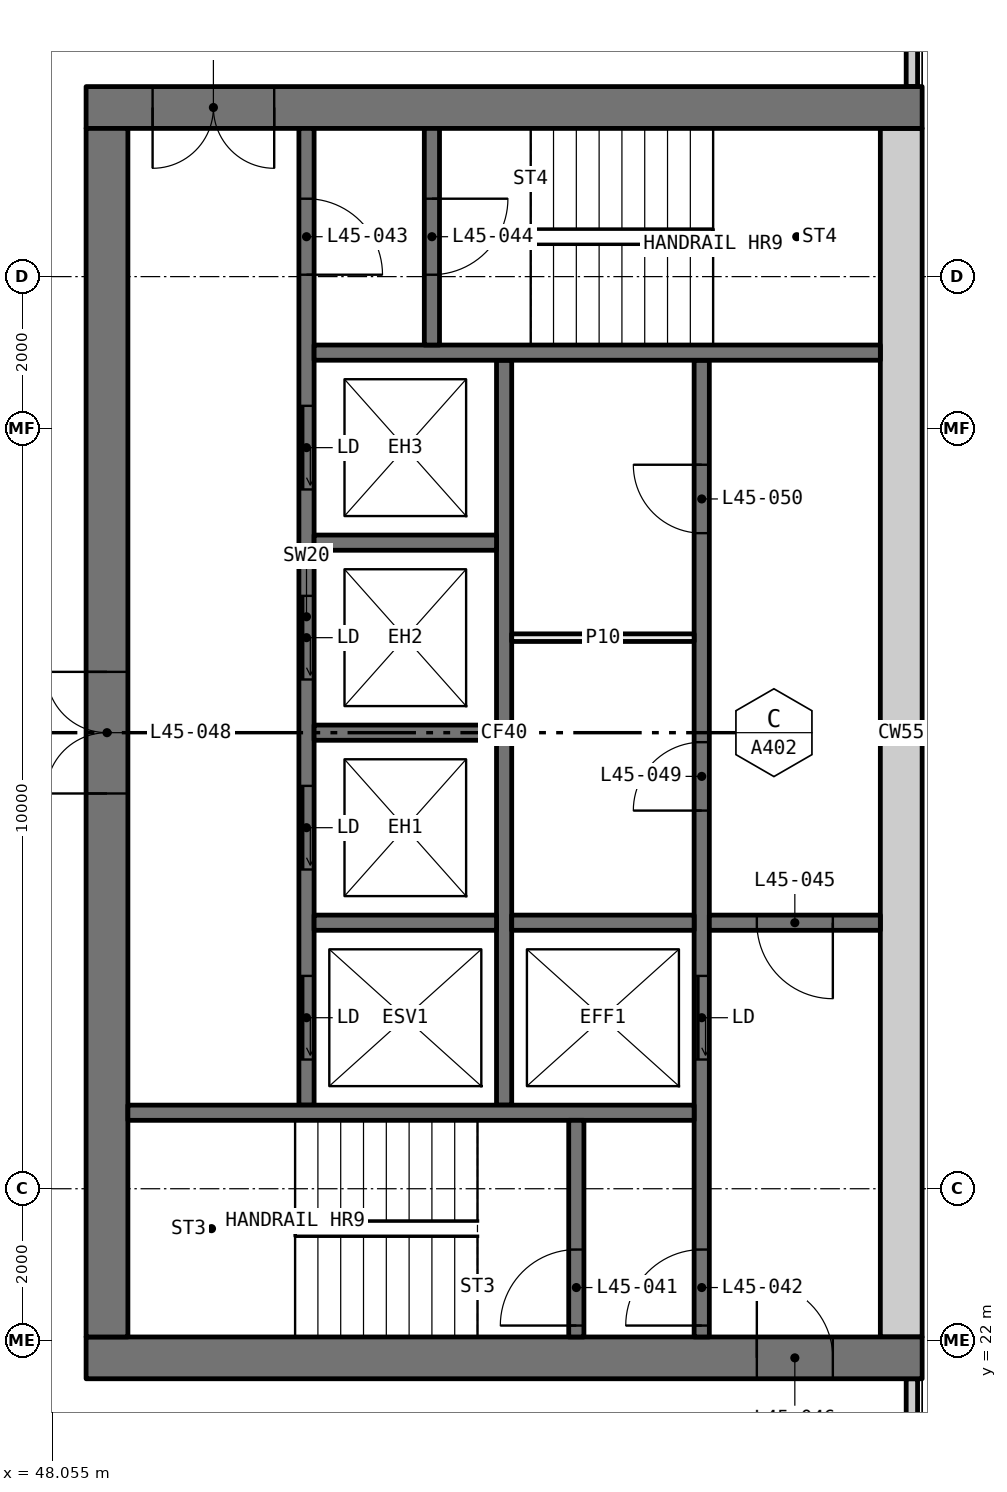
"""IFC4 building model, lengths in metres.
Left out: names, types, materials, properties, quantities, classifications, styles, units other than length and angle.
Written with IfcOpenShell. Run it as: python <this file> out.ifc"""

import sys

from ifc_helpers import new_model, si_unit, direction, frame, frame_2d, origin, place, context, subcontext, project, spatial, rectangle, extrude, element, fill, save


model = new_model("IFC4")
c1 = context("Model", 3, precision=1e-05, world=origin(), true_north=direction((0.0, 1.0)))
c2 = subcontext(c1, "Body", "Model", "MODEL_VIEW")
j1 = project(units=[si_unit("LENGTHUNIT", "METRE"), si_unit("PLANEANGLEUNIT", "RADIAN")], contexts=[c1])
p1 = place(None, origin())
s1 = spatial("IfcSite", under=j1, at=p1, CompositionType="ELEMENT")
p2 = place(p1, origin())
s2 = spatial("IfcBuilding", under=s1, at=p2, CompositionType="ELEMENT")
p3 = place(p2, frame((0.0, 0.0, 172.05)))
s3 = spatial("IfcBuildingStorey", under=s2, at=p3, CompositionType="ELEMENT", Elevation=172.05)
for number, where, z_axis, x_axis in (
    (1, (59.365, 18.71, 0.0), (0.0, 0.0, 1.0), (0.0, 1.0, 0.0)),
    (2, (59.365, 38.5, 0.0), (0.0, 0.0, 1.0), (0.0, 1.0, 0.0)),
):
    element("IfcWall", number, at=place(p3, frame(where, z_axis=z_axis, x_axis=x_axis)), inside=s3, PredefinedType="ELEMENTEDWALL", context=c2, shape_type="SweptSolid", body=[
        extrude(rectangle(XDim=2.79, YDim=0.15, at=frame_2d((1.395, 0.0))), origin(), (0.0, 0.0, 1.0), 3.05),
    ])
p4 = place(p3, frame((59.5, 21.775, 0.0), z_axis=(0.0, 0.0, 1.0), x_axis=(-1.0, 0.0, 0.0)))
e3 = element("IfcWall", 3, at=p4, inside=s3, PredefinedType="SHEAR", context=c2, shape_type="SweptSolid", body=[
    extrude(rectangle(XDim=11.0, YDim=0.55, at=frame_2d((5.5, 0.0))), origin(), (0.0, 0.0, 1.0), 3.05),
])
p5 = place(p4, frame((1.175, 0.0, 0.0)))
e4 = element("IfcOpeningElement", 4, at=p5, cuts=e3, PredefinedType="OPENING", context=c2, shape_type="SweptSolid", body=[
    extrude(rectangle(XDim=1.0, YDim=2.1, at=frame_2d((0.5, 1.05))), frame((0.0, 0.285, 0.0), z_axis=(0.0, -1.0, 0.0), x_axis=(1.0, 0.0, 0.0)), (0.0, 0.0, 1.0), 0.57),
])
p6 = place(p3, frame((59.5, 38.225, 0.0), z_axis=(0.0, 0.0, 1.0), x_axis=(-1.0, 0.0, 0.0)))
e5 = element("IfcWall", 5, at=p6, inside=s3, PredefinedType="SHEAR", context=c2, shape_type="SweptSolid", body=[
    extrude(rectangle(XDim=11.0, YDim=0.55, at=frame_2d((5.5, 0.0))), origin(), (0.0, 0.0, 1.0), 3.05),
])
p7 = place(p6, frame((8.525, 0.0, 0.0)))
e6 = element("IfcOpeningElement", 6, at=p7, cuts=e5, PredefinedType="OPENING", context=c2, shape_type="SweptSolid", body=[
    extrude(rectangle(XDim=1.6, YDim=2.1, at=frame_2d((0.8, 1.05))), frame((0.0, 0.285, 0.0), z_axis=(0.0, -1.0, 0.0), x_axis=(1.0, 0.0, 0.0)), (0.0, 0.0, 1.0), 0.57),
])
p8 = place(p3, frame((59.225, 22.05, 0.0), z_axis=(0.0, 0.0, 1.0), x_axis=(0.0, 1.0, 0.0)))
e7 = element("IfcWall", 7, at=p8, inside=s3, PredefinedType="SHEAR", context=c2, shape_type="SweptSolid", body=[
    extrude(rectangle(XDim=15.9, YDim=0.55, at=frame_2d((7.95, 0.0))), origin(), (0.0, 0.0, 1.0), 3.05),
])
p9 = place(p3, frame((48.775, 22.05, 0.0), z_axis=(0.0, 0.0, 1.0), x_axis=(0.0, 1.0, 0.0)))
e8 = element("IfcWall", 8, at=p9, inside=s3, PredefinedType="SHEAR", context=c2, shape_type="SweptSolid", body=[
    extrude(rectangle(XDim=15.9, YDim=0.55, at=frame_2d((7.95, 0.0))), origin(), (0.0, 0.0, 1.0), 3.05),
])
p10 = place(p9, frame((7.15, 0.0, 0.0)))
e9 = element("IfcOpeningElement", 9, at=p10, cuts=e8, PredefinedType="OPENING", context=c2, shape_type="SweptSolid", body=[
    extrude(rectangle(XDim=1.6, YDim=2.1, at=frame_2d((0.8, 1.05))), frame((0.0, 0.285, 0.0), z_axis=(0.0, -1.0, 0.0), x_axis=(1.0, 0.0, 0.0)), (0.0, 0.0, 1.0), 0.57),
])
p11 = place(p3, frame((56.6, 22.05, 0.0), z_axis=(0.0, 0.0, 1.0), x_axis=(0.0, 1.0, 0.0)))
e10 = element("IfcWall", 10, at=p11, inside=s3, PredefinedType="SOLIDWALL", context=c2, shape_type="SweptSolid", body=[
    extrude(rectangle(XDim=12.85, YDim=0.2, at=frame_2d((6.425, 0.0))), origin(), (0.0, 0.0, 1.0), 3.05),
])
p12 = place(p11, frame((3.65, 0.0, 0.0)))
e11 = element("IfcOpeningElement", 11, at=p12, cuts=e10, PredefinedType="OPENING", context=c2, shape_type="SweptSolid", body=[
    extrude(rectangle(XDim=1.1, YDim=2.1, at=frame_2d((0.55, 1.05))), frame((0.0, 0.11, 0.0), z_axis=(0.0, -1.0, 0.0), x_axis=(1.0, 0.0, 0.0)), (0.0, 0.0, 1.0), 0.22),
])
p13 = place(p11, frame((0.15, 0.0, 0.0)))
e12 = element("IfcOpeningElement", 12, at=p13, cuts=e10, PredefinedType="OPENING", context=c2, shape_type="SweptSolid", body=[
    extrude(rectangle(XDim=1.0, YDim=2.1, at=frame_2d((0.5, 1.05))), frame((0.0, 0.11, 0.0), z_axis=(0.0, -1.0, 0.0), x_axis=(1.0, 0.0, 0.0)), (0.0, 0.0, 1.0), 0.22),
])
p14 = place(p11, frame((6.925, 0.0, 0.0)))
e13 = element("IfcOpeningElement", 13, at=p14, cuts=e10, PredefinedType="OPENING", context=c2, shape_type="SweptSolid", body=[
    extrude(rectangle(XDim=0.9, YDim=2.1, at=frame_2d((0.45, 1.05))), frame((0.0, 0.11, 0.0), z_axis=(0.0, -1.0, 0.0), x_axis=(1.0, 0.0, 0.0)), (0.0, 0.0, 1.0), 0.22),
])
p15 = place(p11, frame((10.575, 0.0, 0.0)))
e14 = element("IfcOpeningElement", 14, at=p15, cuts=e10, PredefinedType="OPENING", context=c2, shape_type="SweptSolid", body=[
    extrude(rectangle(XDim=0.9, YDim=2.1, at=frame_2d((0.45, 1.05))), frame((0.0, 0.11, 0.0), z_axis=(0.0, -1.0, 0.0), x_axis=(1.0, 0.0, 0.0)), (0.0, 0.0, 1.0), 0.22),
])
p16 = place(p3, frame((51.4, 25.1, 0.0), z_axis=(0.0, 0.0, 1.0), x_axis=(0.0, 1.0, 0.0)))
e15 = element("IfcWall", 15, at=p16, inside=s3, PredefinedType="SOLIDWALL", context=c2, shape_type="SweptSolid", body=[
    extrude(rectangle(XDim=12.85, YDim=0.2, at=frame_2d((6.425, 0.0))), origin(), (0.0, 0.0, 1.0), 3.05),
])
p17 = place(p16, frame((0.6, 0.0, 0.0)))
e16 = element("IfcOpeningElement", 16, at=p17, cuts=e15, PredefinedType="OPENING", context=c2, shape_type="SweptSolid", body=[
    extrude(rectangle(XDim=1.1, YDim=2.1, at=frame_2d((0.55, 1.05))), frame((0.0, 0.11, 0.0), z_axis=(0.0, -1.0, 0.0), x_axis=(1.0, 0.0, 0.0)), (0.0, 0.0, 1.0), 0.22),
])
p18 = place(p16, frame((3.1, 0.0, 0.0)))
e17 = element("IfcOpeningElement", 17, at=p18, cuts=e15, PredefinedType="OPENING", context=c2, shape_type="SweptSolid", body=[
    extrude(rectangle(XDim=1.1, YDim=2.1, at=frame_2d((0.55, 1.05))), frame((0.0, 0.11, 0.0), z_axis=(0.0, -1.0, 0.0), x_axis=(1.0, 0.0, 0.0)), (0.0, 0.0, 1.0), 0.22),
])
p19 = place(p16, frame((5.6, 0.0, 0.0)))
e18 = element("IfcOpeningElement", 18, at=p19, cuts=e15, PredefinedType="OPENING", context=c2, shape_type="SweptSolid", body=[
    extrude(rectangle(XDim=1.1, YDim=2.1, at=frame_2d((0.55, 1.05))), frame((0.0, 0.11, 0.0), z_axis=(0.0, -1.0, 0.0), x_axis=(1.0, 0.0, 0.0)), (0.0, 0.0, 1.0), 0.22),
])
p20 = place(p16, frame((8.1, 0.0, 0.0)))
e19 = element("IfcOpeningElement", 19, at=p20, cuts=e15, PredefinedType="OPENING", context=c2, shape_type="SweptSolid", body=[
    extrude(rectangle(XDim=1.1, YDim=2.1, at=frame_2d((0.55, 1.05))), frame((0.0, 0.11, 0.0), z_axis=(0.0, -1.0, 0.0), x_axis=(1.0, 0.0, 0.0)), (0.0, 0.0, 1.0), 0.22),
])
p21 = place(p16, frame((10.925, 0.0, 0.0)))
e20 = element("IfcOpeningElement", 20, at=p21, cuts=e15, PredefinedType="OPENING", context=c2, shape_type="SweptSolid", body=[
    extrude(rectangle(XDim=1.0, YDim=2.1, at=frame_2d((0.5, 1.05))), frame((0.0, 0.11, 0.0), z_axis=(0.0, -1.0, 0.0), x_axis=(1.0, 0.0, 0.0)), (0.0, 0.0, 1.0), 0.22),
])
p22 = place(p3, frame((54.0, 25.1, 0.0), z_axis=(0.0, 0.0, 1.0), x_axis=(0.0, 1.0, 0.0)))
e21 = element("IfcWall", 21, at=p22, inside=s3, PredefinedType="SOLIDWALL", context=c2, shape_type="SweptSolid", body=[
    extrude(rectangle(XDim=9.8, YDim=0.2, at=frame_2d((4.9, 0.0))), origin(), (0.0, 0.0, 1.0), 3.05),
])
for number, where, z_axis, x_axis in (
    (22, (56.5, 25.0, 0.0), (0.0, 0.0, 1.0), (-1.0, 0.0, 0.0)),
    (23, (58.95, 35.0, 0.0), (0.0, 0.0, 1.0), (-1.0, 0.0, 0.0)),
):
    element("IfcWall", number, at=place(p3, frame(where, z_axis=z_axis, x_axis=x_axis)), inside=s3, PredefinedType="SOLIDWALL", context=c2, shape_type="SweptSolid", body=[
        extrude(rectangle(XDim=7.45, YDim=0.2, at=frame_2d((3.725, 0.0))), origin(), (0.0, 0.0, 1.0), 3.05),
    ])
p23 = place(p3, frame((58.95, 27.5, 0.0), z_axis=(0.0, 0.0, 1.0), x_axis=(-1.0, 0.0, 0.0)))
e24 = element("IfcWall", 24, at=p23, inside=s3, PredefinedType="SOLIDWALL", context=c2, shape_type="SweptSolid", body=[
    extrude(rectangle(XDim=2.25, YDim=0.2, at=frame_2d((1.125, 0.0))), origin(), (0.0, 0.0, 1.0), 3.05),
])
p24 = place(p23, frame((0.625, 0.0, 0.0)))
e25 = element("IfcOpeningElement", 25, at=p24, cuts=e24, PredefinedType="OPENING", context=c2, shape_type="SweptSolid", body=[
    extrude(rectangle(XDim=1.0, YDim=2.1, at=frame_2d((0.5, 1.05))), frame((0.0, 0.11, 0.0), z_axis=(0.0, -1.0, 0.0), x_axis=(1.0, 0.0, 0.0)), (0.0, 0.0, 1.0), 0.22),
])
p25 = place(p3, frame((54.95, 22.05, 0.0), z_axis=(0.0, 0.0, 1.0), x_axis=(0.0, 1.0, 0.0)))
e26 = element("IfcWall", 26, at=p25, inside=s3, PredefinedType="SOLIDWALL", context=c2, shape_type="SweptSolid", body=[
    extrude(rectangle(XDim=2.85, YDim=0.2, at=frame_2d((1.425, 0.0))), origin(), (0.0, 0.0, 1.0), 3.05),
])
p26 = place(p25, frame((0.15, 0.0, 0.0)))
e27 = element("IfcOpeningElement", 27, at=p26, cuts=e26, PredefinedType="OPENING", context=c2, shape_type="SweptSolid", body=[
    extrude(rectangle(XDim=1.0, YDim=2.1, at=frame_2d((0.5, 1.05))), frame((0.0, 0.11, 0.0), z_axis=(0.0, -1.0, 0.0), x_axis=(1.0, 0.0, 0.0)), (0.0, 0.0, 1.0), 0.22),
])
p27 = place(p3, frame((53.05, 35.1, 0.0), z_axis=(0.0, 0.0, 1.0), x_axis=(0.0, 1.0, 0.0)))
e28 = element("IfcWall", 28, at=p27, inside=s3, PredefinedType="SOLIDWALL", context=c2, shape_type="SweptSolid", body=[
    extrude(rectangle(XDim=2.85, YDim=0.2, at=frame_2d((1.425, 0.0))), origin(), (0.0, 0.0, 1.0), 3.05),
])
p28 = place(p27, frame((0.925, 0.0, 0.0)))
e29 = element("IfcOpeningElement", 29, at=p28, cuts=e28, PredefinedType="OPENING", context=c2, shape_type="SweptSolid", body=[
    extrude(rectangle(XDim=1.0, YDim=2.1, at=frame_2d((0.5, 1.05))), frame((0.0, 0.11, 0.0), z_axis=(0.0, -1.0, 0.0), x_axis=(1.0, 0.0, 0.0)), (0.0, 0.0, 1.0), 0.22),
])
for number, where, z_axis, x_axis in (
    (30, (56.5, 27.5, 0.0), (0.0, 0.0, 1.0), (-1.0, 0.0, 0.0)),
    (31, (53.9, 27.5, 0.0), (0.0, 0.0, 1.0), (-1.0, 0.0, 0.0)),
    (32, (53.9, 30.0, 0.0), (0.0, 0.0, 1.0), (-1.0, 0.0, 0.0)),
    (33, (53.9, 32.5, 0.0), (0.0, 0.0, 1.0), (-1.0, 0.0, 0.0)),
):
    element("IfcWall", number, at=place(p3, frame(where, z_axis=z_axis, x_axis=x_axis)), inside=s3, PredefinedType="SOLIDWALL", context=c2, shape_type="SweptSolid", body=[
        extrude(rectangle(XDim=2.4, YDim=0.2, at=frame_2d((1.2, 0.0))), origin(), (0.0, 0.0, 1.0), 3.05),
    ])
p29 = place(p3, frame((56.5, 31.25, 0.0), z_axis=(0.0, 0.0, 1.0), x_axis=(-1.0, 0.0, 0.0)))
e34 = element("IfcWall", 34, at=p29, inside=s3, PredefinedType="PARTITIONING", context=c2, shape_type="SweptSolid", body=[
    extrude(rectangle(XDim=2.4, YDim=0.1, at=frame_2d((1.2, 0.0))), origin(), (0.0, 0.0, 1.0), 3.05),
])
p30 = place(p17, origin())
e35 = element("IfcDoor", 35, at=p30, inside=s3, OperationType="SLIDING_TO_LEFT", PredefinedType="DOOR", context=c2, shape_type="SweptSolid", body=[
    extrude(rectangle(XDim=1.1, YDim=2.1, at=frame_2d((0.55, 1.05))), frame((0.0, 0.025, 0.0), z_axis=(0.0, -1.0, 0.0), x_axis=(1.0, 0.0, 0.0)), (0.0, 0.0, 1.0), 0.05),
])
fill(e16, e35)
p31 = place(p18, origin())
e36 = element("IfcDoor", 36, at=p31, inside=s3, OperationType="SLIDING_TO_LEFT", PredefinedType="DOOR", context=c2, shape_type="SweptSolid", body=[
    extrude(rectangle(XDim=1.1, YDim=2.1, at=frame_2d((0.55, 1.05))), frame((0.0, 0.025, 0.0), z_axis=(0.0, -1.0, 0.0), x_axis=(1.0, 0.0, 0.0)), (0.0, 0.0, 1.0), 0.05),
])
fill(e17, e36)
p32 = place(p19, origin())
e37 = element("IfcDoor", 37, at=p32, inside=s3, OperationType="SLIDING_TO_LEFT", PredefinedType="DOOR", context=c2, shape_type="SweptSolid", body=[
    extrude(rectangle(XDim=1.1, YDim=2.1, at=frame_2d((0.55, 1.05))), frame((0.0, 0.025, 0.0), z_axis=(0.0, -1.0, 0.0), x_axis=(1.0, 0.0, 0.0)), (0.0, 0.0, 1.0), 0.05),
])
fill(e18, e37)
p33 = place(p20, origin())
e38 = element("IfcDoor", 38, at=p33, inside=s3, OperationType="SLIDING_TO_LEFT", PredefinedType="DOOR", context=c2, shape_type="SweptSolid", body=[
    extrude(rectangle(XDim=1.1, YDim=2.1, at=frame_2d((0.55, 1.05))), frame((0.0, 0.025, 0.0), z_axis=(0.0, -1.0, 0.0), x_axis=(1.0, 0.0, 0.0)), (0.0, 0.0, 1.0), 0.05),
])
fill(e19, e38)
p34 = place(p12, origin())
e39 = element("IfcDoor", 39, at=p34, inside=s3, OperationType="SLIDING_TO_LEFT", PredefinedType="DOOR", context=c2, shape_type="SweptSolid", body=[
    extrude(rectangle(XDim=1.1, YDim=2.1, at=frame_2d((0.55, 1.05))), frame((0.0, 0.025, 0.0), z_axis=(0.0, -1.0, 0.0), x_axis=(1.0, 0.0, 0.0)), (0.0, 0.0, 1.0), 0.05),
])
fill(e11, e39)
p35 = place(p26, origin())
e40 = element("IfcDoor", 40, at=p35, inside=s3, OperationType="SINGLE_SWING_RIGHT", PredefinedType="DOOR", context=c2, shape_type="SweptSolid", body=[
    extrude(rectangle(XDim=1.0, YDim=2.1, at=frame_2d((0.5, 1.05))), frame((0.0, 0.025, 0.0), z_axis=(0.0, -1.0, 0.0), x_axis=(1.0, 0.0, 0.0)), (0.0, 0.0, 1.0), 0.05),
])
fill(e27, e40)
p36 = place(p13, origin())
e41 = element("IfcDoor", 41, at=p36, inside=s3, OperationType="SINGLE_SWING_RIGHT", PredefinedType="DOOR", context=c2, shape_type="SweptSolid", body=[
    extrude(rectangle(XDim=1.0, YDim=2.1, at=frame_2d((0.5, 1.05))), frame((0.0, 0.025, 0.0), z_axis=(0.0, -1.0, 0.0), x_axis=(1.0, 0.0, 0.0)), (0.0, 0.0, 1.0), 0.05),
])
fill(e12, e41)
p37 = place(p21, frame((1.0, 0.0, 0.0), x_axis=(-1.0, 0.0, 0.0)))
e42 = element("IfcDoor", 42, at=p37, inside=s3, OperationType="SINGLE_SWING_LEFT", PredefinedType="DOOR", context=c2, shape_type="SweptSolid", body=[
    extrude(rectangle(XDim=1.0, YDim=2.1, at=frame_2d((0.5, 1.05))), frame((0.0, 0.025, 0.0), z_axis=(0.0, -1.0, 0.0), x_axis=(1.0, 0.0, 0.0)), (0.0, 0.0, 1.0), 0.05),
])
fill(e20, e42)
p38 = place(p28, frame((1.0, 0.0, 0.0), x_axis=(-1.0, 0.0, 0.0)))
e43 = element("IfcDoor", 43, at=p38, inside=s3, OperationType="SINGLE_SWING_RIGHT", PredefinedType="DOOR", context=c2, shape_type="SweptSolid", body=[
    extrude(rectangle(XDim=1.0, YDim=2.1, at=frame_2d((0.5, 1.05))), frame((0.0, 0.025, 0.0), z_axis=(0.0, -1.0, 0.0), x_axis=(1.0, 0.0, 0.0)), (0.0, 0.0, 1.0), 0.05),
])
fill(e29, e43)
p39 = place(p24, origin())
e44 = element("IfcDoor", 44, at=p39, inside=s3, OperationType="SINGLE_SWING_RIGHT", PredefinedType="DOOR", context=c2, shape_type="SweptSolid", body=[
    extrude(rectangle(XDim=1.0, YDim=2.1, at=frame_2d((0.5, 1.05))), frame((0.0, 0.025, 0.0), z_axis=(0.0, -1.0, 0.0), x_axis=(1.0, 0.0, 0.0)), (0.0, 0.0, 1.0), 0.05),
])
fill(e25, e44)
p40 = place(p5, frame((1.0, 0.0, 0.0), x_axis=(-1.0, 0.0, 0.0)))
e45 = element("IfcDoor", 45, at=p40, inside=s3, OperationType="SINGLE_SWING_RIGHT", PredefinedType="DOOR", context=c2, shape_type="SweptSolid", body=[
    extrude(rectangle(XDim=1.0, YDim=2.1, at=frame_2d((0.5, 1.05))), frame((0.0, 0.025, 0.0), z_axis=(0.0, -1.0, 0.0), x_axis=(1.0, 0.0, 0.0)), (0.0, 0.0, 1.0), 0.05),
])
fill(e4, e45)
p41 = place(p7, origin())
e46 = element("IfcDoor", 46, at=p41, inside=s3, OperationType="DOUBLE_DOOR_SINGLE_SWING", PredefinedType="DOOR", context=c2, shape_type="SweptSolid", body=[
    extrude(rectangle(XDim=1.6, YDim=2.1, at=frame_2d((0.8, 1.05))), frame((0.0, 0.025, 0.0), z_axis=(0.0, -1.0, 0.0), x_axis=(1.0, 0.0, 0.0)), (0.0, 0.0, 1.0), 0.05),
])
fill(e6, e46)
p42 = place(p10, origin())
e47 = element("IfcDoor", 47, at=p42, inside=s3, OperationType="DOUBLE_DOOR_SINGLE_SWING", PredefinedType="DOOR", context=c2, shape_type="SweptSolid", body=[
    extrude(rectangle(XDim=1.6, YDim=2.1, at=frame_2d((0.8, 1.05))), frame((0.0, 0.025, 0.0), z_axis=(0.0, -1.0, 0.0), x_axis=(1.0, 0.0, 0.0)), (0.0, 0.0, 1.0), 0.05),
])
fill(e9, e47)
p43 = place(p14, origin())
e48 = element("IfcDoor", 48, at=p43, inside=s3, OperationType="SINGLE_SWING_RIGHT", PredefinedType="DOOR", context=c2, shape_type="SweptSolid", body=[
    extrude(rectangle(XDim=0.9, YDim=2.1, at=frame_2d((0.45, 1.05))), frame((0.0, 0.025, 0.0), z_axis=(0.0, -1.0, 0.0), x_axis=(1.0, 0.0, 0.0)), (0.0, 0.0, 1.0), 0.05),
])
fill(e13, e48)
p44 = place(p15, origin())
e49 = element("IfcDoor", 49, at=p44, inside=s3, OperationType="SINGLE_SWING_LEFT", PredefinedType="DOOR", context=c2, shape_type="SweptSolid", body=[
    extrude(rectangle(XDim=0.9, YDim=2.1, at=frame_2d((0.45, 1.05))), frame((0.0, 0.025, 0.0), z_axis=(0.0, -1.0, 0.0), x_axis=(1.0, 0.0, 0.0)), (0.0, 0.0, 1.0), 0.05),
])
fill(e14, e49)
save(model, sys.argv[1])
